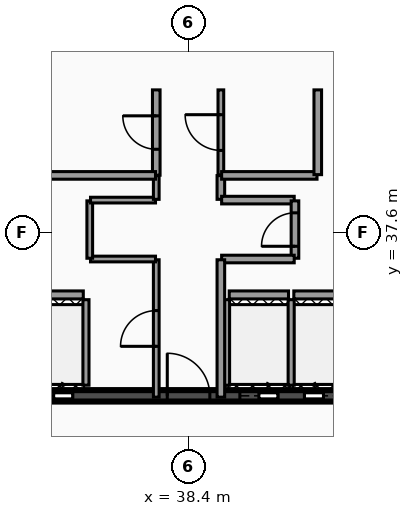
"""IFC4 building model, lengths in metres.
Left out: names, types, materials, properties, quantities, classifications, styles, units other than length and angle.
Written with IfcOpenShell. Run it as: python <this file> out.ifc"""

import sys

from ifc_helpers import new_model, si_unit, direction, frame, frame_2d, origin, place, context, subcontext, project, spatial, rectangle, extrude, element, fill, save


model = new_model("IFC4")
c1 = context("Model", 3, precision=1e-05, world=origin(), true_north=direction((0.0, 1.0)))
c2 = subcontext(c1, "Body", "Model", "MODEL_VIEW")
j1 = project(units=[si_unit("LENGTHUNIT", "METRE"), si_unit("PLANEANGLEUNIT", "RADIAN")], contexts=[c1])
p1 = place(None, origin())
s1 = spatial("IfcSite", under=j1, at=p1, CompositionType="ELEMENT")
p2 = place(p1, origin())
s2 = spatial("IfcBuilding", under=s1, at=p2, CompositionType="ELEMENT")
p3 = place(p2, frame((0.0, 0.0, 265.2)))
s3 = spatial("IfcBuildingStorey", under=s2, at=p3, CompositionType="ELEMENT", Elevation=265.2)
p4 = place(p3, frame((28.5, 33.3, 0.0), z_axis=(0.0, 0.0, 1.0), x_axis=(1.0, 0.0, 0.0)))
e1 = element("IfcWall", 1, at=p4, inside=s3, PredefinedType="SHEAR", context=c2, shape_type="SweptSolid", body=[
    extrude(rectangle(XDim=19.86, YDim=0.3, at=frame_2d((9.93, 0.0))), origin(), (0.0, 0.0, 1.0), 3.18),
])
p5 = place(p4, frame((3.93, 0.0, 0.0)))
e2 = element("IfcOpeningElement", 2, at=p5, cuts=e1, PredefinedType="OPENING", context=c2, shape_type="SweptSolid", body=[
    extrude(rectangle(XDim=1.1, YDim=2.15, at=frame_2d((0.55, 1.075))), frame((0.0, 0.16, 0.0), z_axis=(0.0, -1.0, 0.0), x_axis=(1.0, 0.0, 0.0)), (0.0, 0.0, 1.0), 0.32),
])
p6 = place(p4, frame((14.77, 0.0, 0.0)))
e3 = element("IfcOpeningElement", 3, at=p6, cuts=e1, PredefinedType="OPENING", context=c2, shape_type="SweptSolid", body=[
    extrude(rectangle(XDim=1.1, YDim=2.15, at=frame_2d((0.55, 1.075))), frame((0.0, 0.16, 0.0), z_axis=(0.0, -1.0, 0.0), x_axis=(1.0, 0.0, 0.0)), (0.0, 0.0, 1.0), 0.32),
])
p7 = place(p4, frame((11.25, 0.0, 0.0)))
e4 = element("IfcOpeningElement", 4, at=p7, cuts=e1, PredefinedType="OPENING", context=c2, shape_type="SweptSolid", body=[
    extrude(rectangle(XDim=1.0, YDim=2.1, at=frame_2d((0.5, 1.05))), frame((0.0, 0.16, 0.0), z_axis=(0.0, -1.0, 0.0), x_axis=(1.0, 0.0, 0.0)), (0.0, 0.0, 1.0), 0.32),
])
p8 = place(p4, frame((12.95, 0.0, 0.0)))
e5 = element("IfcOpeningElement", 5, at=p8, cuts=e1, PredefinedType="OPENING", context=c2, shape_type="SweptSolid", body=[
    extrude(rectangle(XDim=1.0, YDim=2.1, at=frame_2d((0.5, 1.05))), frame((0.0, 0.16, 0.0), z_axis=(0.0, -1.0, 0.0), x_axis=(1.0, 0.0, 0.0)), (0.0, 0.0, 1.0), 0.32),
])
p9 = place(p4, frame((5.85, 0.0, 0.0)))
e6 = element("IfcOpeningElement", 6, at=p9, cuts=e1, PredefinedType="OPENING", context=c2, shape_type="SweptSolid", body=[
    extrude(rectangle(XDim=1.0, YDim=2.1, at=frame_2d((0.5, 1.05))), frame((0.0, 0.16, 0.0), z_axis=(0.0, -1.0, 0.0), x_axis=(1.0, 0.0, 0.0)), (0.0, 0.0, 1.0), 0.32),
])
p10 = place(p4, frame((1.21, 0.0, 0.0)))
e7 = element("IfcOpeningElement", 7, at=p10, cuts=e1, PredefinedType="OPENING", context=c2, shape_type="SweptSolid", body=[
    extrude(rectangle(XDim=1.1, YDim=2.2, at=frame_2d((0.55, 1.1))), frame((0.0, 0.16, 0.0), z_axis=(0.0, -1.0, 0.0), x_axis=(1.0, 0.0, 0.0)), (0.0, 0.0, 1.0), 0.32),
])
p11 = place(p4, frame((9.34, 0.0, 0.0)))
e8 = element("IfcOpeningElement", 8, at=p11, cuts=e1, PredefinedType="OPENING", context=c2, shape_type="SweptSolid", body=[
    extrude(rectangle(XDim=1.12, YDim=2.05, at=frame_2d((0.56, 1.025))), frame((0.0, 0.16, 0.0), z_axis=(0.0, -1.0, 0.0), x_axis=(1.0, 0.0, 0.0)), (0.0, 0.0, 1.0), 0.32),
])
p12 = place(p4, frame((17.55, 0.0, 0.0)))
e9 = element("IfcOpeningElement", 9, at=p12, cuts=e1, PredefinedType="OPENING", context=c2, shape_type="SweptSolid", body=[
    extrude(rectangle(XDim=1.1, YDim=2.2, at=frame_2d((0.55, 1.1))), frame((0.0, 0.16, 0.0), z_axis=(0.0, -1.0, 0.0), x_axis=(1.0, 0.0, 0.0)), (0.0, 0.0, 1.0), 0.32),
])
p13 = place(p3, frame((39.47, 35.955, 0.0), z_axis=(0.0, 0.0, 1.0), x_axis=(1.0, 0.0, 0.0)))
e10 = element("IfcWall", 10, at=p13, inside=s3, PredefinedType="SOLIDWALL", context=c2, shape_type="SweptSolid", body=[
    extrude(rectangle(XDim=1.56, YDim=0.21, at=frame_2d((0.78, 0.0))), origin(), (0.0, 0.0, 1.0), 3.18),
])
for number, where, z_axis, x_axis in (
    (11, (39.4, 33.58, 0.0), (0.0, 0.0, 1.0), (0.0, 1.0, 0.0)),
    (12, (41.1, 33.58, 0.0), (0.0, 0.0, 1.0), (0.0, 1.0, 0.0)),
):
    element("IfcWall", number, at=place(p3, frame(where, z_axis=z_axis, x_axis=x_axis)), inside=s3, PredefinedType="SOLIDWALL", context=c2, shape_type="SweptSolid", body=[
        extrude(rectangle(XDim=2.25, YDim=0.16, at=frame_2d((1.125, 0.0))), origin(), (0.0, 0.0, 1.0), 3.18),
    ])
p14 = place(p3, frame((41.17, 35.955, 0.0), z_axis=(0.0, 0.0, 1.0), x_axis=(1.0, 0.0, 0.0)))
e13 = element("IfcWall", 13, at=p14, inside=s3, PredefinedType="SOLIDWALL", context=c2, shape_type="SweptSolid", body=[
    extrude(rectangle(XDim=1.56, YDim=0.21, at=frame_2d((0.78, 0.0))), origin(), (0.0, 0.0, 1.0), 3.18),
])
p15 = place(p3, frame((34.07, 35.955, 0.0), z_axis=(0.0, 0.0, 1.0), x_axis=(1.0, 0.0, 0.0)))
e14 = element("IfcWall", 14, at=p15, inside=s3, PredefinedType="SOLIDWALL", context=c2, shape_type="SweptSolid", body=[
    extrude(rectangle(XDim=1.56, YDim=0.21, at=frame_2d((0.78, 0.0))), origin(), (0.0, 0.0, 1.0), 3.18),
])
p16 = place(p3, frame((35.7, 33.58, 0.0), z_axis=(0.0, 0.0, 1.0), x_axis=(0.0, 1.0, 0.0)))
e15 = element("IfcWall", 15, at=p16, inside=s3, PredefinedType="SOLIDWALL", context=c2, shape_type="SweptSolid", body=[
    extrude(rectangle(XDim=2.25, YDim=0.16, at=frame_2d((1.125, 0.0))), origin(), (0.0, 0.0, 1.0), 3.18),
])
p17 = place(p3, frame((37.55, 33.265, 0.0), z_axis=(0.0, 0.0, 1.0), x_axis=(0.0, 1.0, 0.0)))
e16 = element("IfcWall", 16, at=p17, inside=s3, PredefinedType="PARTITIONING", context=c2, shape_type="SweptSolid", body=[
    extrude(rectangle(XDim=3.615, YDim=0.15, at=frame_2d((1.808, 0.0))), origin(), (0.0, 0.0, 1.0), 2.235),
])
p18 = place(p17, frame((1.337, 0.0, 0.0)))
e17 = element("IfcOpeningElement", 17, at=p18, cuts=e16, PredefinedType="OPENING", context=c2, shape_type="SweptSolid", body=[
    extrude(rectangle(XDim=0.94, YDim=2.05, at=frame_2d((0.47, 1.025))), frame((0.0, 0.085, 0.0), z_axis=(0.0, -1.0, 0.0), x_axis=(1.0, 0.0, 0.0)), (0.0, 0.0, 1.0), 0.17),
])
p19 = place(p3, frame((35.82, 36.9, 0.0), z_axis=(0.0, 0.0, 1.0), x_axis=(1.0, 0.0, 0.0)))
e18 = element("IfcWall", 18, at=p19, inside=s3, PredefinedType="PARTITIONING", context=c2, shape_type="SweptSolid", body=[
    extrude(rectangle(XDim=1.71, YDim=0.15, at=frame_2d((0.855, 0.0))), origin(), (0.0, 0.0, 1.0), 2.235),
])
p20 = place(p3, frame((35.8, 36.92, 0.0), z_axis=(0.0, 0.0, 1.0), x_axis=(0.0, 1.0, 0.0)))
e19 = element("IfcWall", 19, at=p20, inside=s3, PredefinedType="PARTITIONING", context=c2, shape_type="SweptSolid", body=[
    extrude(rectangle(XDim=1.51, YDim=0.15, at=frame_2d((0.755, 0.0))), origin(), (0.0, 0.0, 1.0), 2.235),
])
p21 = place(p3, frame((35.82, 38.45, 0.0), z_axis=(0.0, 0.0, 1.0), x_axis=(1.0, 0.0, 0.0)))
e20 = element("IfcWall", 20, at=p21, inside=s3, PredefinedType="PARTITIONING", context=c2, shape_type="SweptSolid", body=[
    extrude(rectangle(XDim=1.71, YDim=0.15, at=frame_2d((0.855, 0.0))), origin(), (0.0, 0.0, 1.0), 2.235),
])
p22 = place(p3, frame((37.55, 38.47, 0.0), z_axis=(0.0, 0.0, 1.0), x_axis=(0.0, 1.0, 0.0)))
e21 = element("IfcWall", 21, at=p22, inside=s3, PredefinedType="PARTITIONING", context=c2, shape_type="SweptSolid", body=[
    extrude(rectangle(XDim=0.625, YDim=0.15, at=frame_2d((0.312, 0.0))), origin(), (0.0, 0.0, 1.0), 2.235),
])
p23 = place(p3, frame((37.55, 39.105, 0.0), z_axis=(0.0, 0.0, 1.0), x_axis=(0.0, 1.0, 0.0)))
e22 = element("IfcWall", 22, at=p23, inside=s3, PredefinedType="PARTITIONING", context=c2, shape_type="SweptSolid", body=[
    extrude(rectangle(XDim=2.245, YDim=0.2, at=frame_2d((1.123, 0.0))), origin(), (0.0, 0.0, 1.0), 2.235),
])
p24 = place(p23, frame((0.683, 0.0, 0.0)))
e23 = element("IfcOpeningElement", 23, at=p24, cuts=e22, PredefinedType="OPENING", context=c2, shape_type="SweptSolid", body=[
    extrude(rectangle(XDim=0.88, YDim=2.05, at=frame_2d((0.44, 1.025))), frame((0.0, 0.11, 0.0), z_axis=(0.0, -1.0, 0.0), x_axis=(1.0, 0.0, 0.0)), (0.0, 0.0, 1.0), 0.22),
])
p25 = place(p3, frame((39.25, 38.47, 0.0), z_axis=(0.0, 0.0, 1.0), x_axis=(0.0, 1.0, 0.0)))
e24 = element("IfcWall", 24, at=p25, inside=s3, PredefinedType="PARTITIONING", context=c2, shape_type="SweptSolid", body=[
    extrude(rectangle(XDim=0.625, YDim=0.2, at=frame_2d((0.312, 0.0))), origin(), (0.0, 0.0, 1.0), 2.235),
])
p26 = place(p3, frame((39.27, 38.45, 0.0), z_axis=(0.0, 0.0, 1.0), x_axis=(1.0, 0.0, 0.0)))
e25 = element("IfcWall", 25, at=p26, inside=s3, PredefinedType="PARTITIONING", context=c2, shape_type="SweptSolid", body=[
    extrude(rectangle(XDim=1.91, YDim=0.2, at=frame_2d((0.955, 0.0))), origin(), (0.0, 0.0, 1.0), 2.235),
])
p27 = place(p3, frame((41.2, 36.92, 0.0), z_axis=(0.0, 0.0, 1.0), x_axis=(0.0, 1.0, 0.0)))
e26 = element("IfcWall", 26, at=p27, inside=s3, PredefinedType="PARTITIONING", context=c2, shape_type="SweptSolid", body=[
    extrude(rectangle(XDim=1.51, YDim=0.2, at=frame_2d((0.755, 0.0))), origin(), (0.0, 0.0, 1.0), 2.235),
])
p28 = place(p27, frame((0.315, 0.0, 0.0)))
e27 = element("IfcOpeningElement", 27, at=p28, cuts=e26, PredefinedType="OPENING", context=c2, shape_type="SweptSolid", body=[
    extrude(rectangle(XDim=0.88, YDim=2.05, at=frame_2d((0.44, 1.025))), frame((0.0, 0.11, 0.0), z_axis=(0.0, -1.0, 0.0), x_axis=(1.0, 0.0, 0.0)), (0.0, 0.0, 1.0), 0.22),
])
p29 = place(p3, frame((39.27, 36.9, 0.0), z_axis=(0.0, 0.0, 1.0), x_axis=(1.0, 0.0, 0.0)))
e28 = element("IfcWall", 28, at=p29, inside=s3, PredefinedType="PARTITIONING", context=c2, shape_type="SweptSolid", body=[
    extrude(rectangle(XDim=1.91, YDim=0.2, at=frame_2d((0.955, 0.0))), origin(), (0.0, 0.0, 1.0), 2.235),
])
p30 = place(p3, frame((39.25, 33.265, 0.0), z_axis=(0.0, 0.0, 1.0), x_axis=(0.0, 1.0, 0.0)))
e29 = element("IfcWall", 29, at=p30, inside=s3, PredefinedType="PARTITIONING", context=c2, shape_type="SweptSolid", body=[
    extrude(rectangle(XDim=3.615, YDim=0.2, at=frame_2d((1.808, 0.0))), origin(), (0.0, 0.0, 1.0), 2.235),
])
p31 = place(p3, frame((39.25, 39.105, 0.0), z_axis=(0.0, 0.0, 1.0), x_axis=(0.0, 1.0, 0.0)))
e30 = element("IfcWall", 30, at=p31, inside=s3, PredefinedType="PARTITIONING", context=c2, shape_type="SweptSolid", body=[
    extrude(rectangle(XDim=2.245, YDim=0.15, at=frame_2d((1.123, 0.0))), origin(), (0.0, 0.0, 1.0), 2.235),
])
p32 = place(p31, frame((0.653, 0.0, 0.0)))
e31 = element("IfcOpeningElement", 31, at=p32, cuts=e30, PredefinedType="OPENING", context=c2, shape_type="SweptSolid", body=[
    extrude(rectangle(XDim=0.94, YDim=2.05, at=frame_2d((0.47, 1.025))), frame((0.0, 0.085, 0.0), z_axis=(0.0, -1.0, 0.0), x_axis=(1.0, 0.0, 0.0)), (0.0, 0.0, 1.0), 0.17),
])
p33 = place(p3, frame((31.885, 39.1, 0.0), z_axis=(0.0, 0.0, 1.0), x_axis=(1.0, 0.0, 0.0)))
e32 = element("IfcWall", 32, at=p33, inside=s3, PredefinedType="PARTITIONING", context=c2, shape_type="SweptSolid", body=[
    extrude(rectangle(XDim=5.645, YDim=0.2, at=frame_2d((2.823, 0.0))), origin(), (0.0, 0.0, 1.0), 2.235),
])
p34 = place(p3, frame((39.27, 39.1, 0.0), z_axis=(0.0, 0.0, 1.0), x_axis=(1.0, 0.0, 0.0)))
e33 = element("IfcWall", 33, at=p34, inside=s3, PredefinedType="PARTITIONING", context=c2, shape_type="SweptSolid", body=[
    extrude(rectangle(XDim=2.51, YDim=0.2, at=frame_2d((1.255, 0.0))), origin(), (0.0, 0.0, 1.0), 2.235),
])
p35 = place(p3, frame((41.8, 39.12, 0.0), z_axis=(0.0, 0.0, 1.0), x_axis=(0.0, 1.0, 0.0)))
e34 = element("IfcWall", 34, at=p35, inside=s3, PredefinedType="PARTITIONING", context=c2, shape_type="SweptSolid", body=[
    extrude(rectangle(XDim=2.23, YDim=0.2, at=frame_2d((1.115, 0.0))), origin(), (0.0, 0.0, 1.0), 2.235),
])
p36 = place(p7, origin())
e35 = element("IfcDoor", 35, at=p36, inside=s3, OperationType="SLIDING_TO_RIGHT", PredefinedType="DOOR", context=c2, shape_type="SweptSolid", body=[
    extrude(rectangle(XDim=1.0, YDim=2.1, at=frame_2d((0.5, 1.05))), frame((0.0, 0.025, 0.0), z_axis=(0.0, -1.0, 0.0), x_axis=(1.0, 0.0, 0.0)), (0.0, 0.0, 1.0), 0.05),
])
fill(e4, e35)
p37 = place(p8, origin())
e36 = element("IfcDoor", 36, at=p37, inside=s3, OperationType="SLIDING_TO_LEFT", PredefinedType="DOOR", context=c2, shape_type="SweptSolid", body=[
    extrude(rectangle(XDim=1.0, YDim=2.1, at=frame_2d((0.5, 1.05))), frame((0.0, 0.025, 0.0), z_axis=(0.0, -1.0, 0.0), x_axis=(1.0, 0.0, 0.0)), (0.0, 0.0, 1.0), 0.05),
])
fill(e5, e36)
p38 = place(p9, origin())
e37 = element("IfcDoor", 37, at=p38, inside=s3, OperationType="SLIDING_TO_RIGHT", PredefinedType="DOOR", context=c2, shape_type="SweptSolid", body=[
    extrude(rectangle(XDim=1.0, YDim=2.1, at=frame_2d((0.5, 1.05))), frame((0.0, 0.025, 0.0), z_axis=(0.0, -1.0, 0.0), x_axis=(1.0, 0.0, 0.0)), (0.0, 0.0, 1.0), 0.05),
])
fill(e6, e37)
p39 = place(p11, origin())
e38 = element("IfcDoor", 38, at=p39, inside=s3, OperationType="SINGLE_SWING_LEFT", PredefinedType="DOOR", context=c2, shape_type="SweptSolid", body=[
    extrude(rectangle(XDim=1.12, YDim=2.05, at=frame_2d((0.56, 1.025))), frame((0.0, 0.025, 0.0), z_axis=(0.0, -1.0, 0.0), x_axis=(1.0, 0.0, 0.0)), (0.0, 0.0, 1.0), 0.05),
])
fill(e8, e38)
p40 = place(p18, origin())
e39 = element("IfcDoor", 39, at=p40, inside=s3, OperationType="SINGLE_SWING_LEFT", PredefinedType="DOOR", context=c2, shape_type="SweptSolid", body=[
    extrude(rectangle(XDim=0.94, YDim=2.05, at=frame_2d((0.47, 1.025))), frame((0.0, 0.025, 0.0), z_axis=(0.0, -1.0, 0.0), x_axis=(1.0, 0.0, 0.0)), (0.0, 0.0, 1.0), 0.05),
])
fill(e17, e39)
p41 = place(p24, origin())
e40 = element("IfcDoor", 40, at=p41, inside=s3, OperationType="SINGLE_SWING_RIGHT", PredefinedType="DOOR", context=c2, shape_type="SweptSolid", body=[
    extrude(rectangle(XDim=0.88, YDim=2.05, at=frame_2d((0.44, 1.025))), frame((0.0, 0.025, 0.0), z_axis=(0.0, -1.0, 0.0), x_axis=(1.0, 0.0, 0.0)), (0.0, 0.0, 1.0), 0.05),
])
fill(e23, e40)
p42 = place(p28, origin())
e41 = element("IfcDoor", 41, at=p42, inside=s3, OperationType="SINGLE_SWING_LEFT", PredefinedType="DOOR", context=c2, shape_type="SweptSolid", body=[
    extrude(rectangle(XDim=0.88, YDim=2.05, at=frame_2d((0.44, 1.025))), frame((0.0, 0.025, 0.0), z_axis=(0.0, -1.0, 0.0), x_axis=(1.0, 0.0, 0.0)), (0.0, 0.0, 1.0), 0.05),
])
fill(e27, e41)
p43 = place(p32, origin())
e42 = element("IfcDoor", 42, at=p43, inside=s3, OperationType="SINGLE_SWING_RIGHT", PredefinedType="DOOR", context=c2, shape_type="SweptSolid", body=[
    extrude(rectangle(XDim=0.94, YDim=2.05, at=frame_2d((0.47, 1.025))), frame((0.0, 0.025, 0.0), z_axis=(0.0, -1.0, 0.0), x_axis=(1.0, 0.0, 0.0)), (0.0, 0.0, 1.0), 0.05),
])
fill(e31, e42)
save(model, sys.argv[1])
